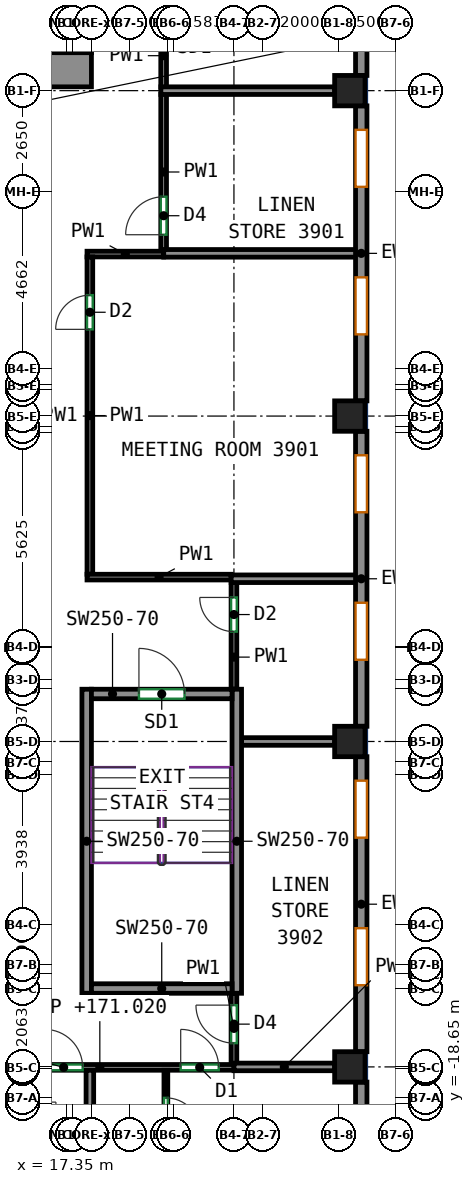
"""IFC4 building model, lengths in metres.
Left out: names, types, materials, properties, quantities, classifications, styles, units other than length and angle.
Written with IfcOpenShell. Run it as: python <this file> out.ifc"""

import sys

from ifc_helpers import new_model, si_unit, direction, frame, frame_2d, origin, origin_2d, place, context, subcontext, project, spatial, rectangle, extrude, source, transform, mapped, element, fill, save


model = new_model("IFC4")
c1 = context("Model", 3, precision=1e-05, world=origin(), true_north=direction((0.0, 1.0)))
c2 = subcontext(c1, "Body", "Model", "MODEL_VIEW")
j1 = project(units=[si_unit("LENGTHUNIT", "METRE"), si_unit("PLANEANGLEUNIT", "RADIAN")], contexts=[c1])
p1 = place(None, origin())
s1 = spatial("IfcSite", under=j1, at=p1, CompositionType="ELEMENT")
p2 = place(p1, origin())
s2 = spatial("IfcBuilding", under=s1, at=p2, CompositionType="ELEMENT")
p3 = place(p2, frame((0.0, 0.0, 168.5)))
s3 = spatial("IfcBuildingStorey", under=s2, at=p3, CompositionType="ELEMENT", Elevation=168.5)
m1 = source(origin(), c2, "Body", "SweptSolid", [
    extrude(rectangle(XDim=0.8, YDim=0.8, at=origin_2d()), origin(), (0.0, 0.0, 1.0), 3.12),
])
for number, where, z_axis, x_axis in (
    (1, (24.8, -17.688, 0.0), (0.0, 0.0, 1.0), (1.0, 0.0, 0.0)),
    (2, (24.8, -9.125, 0.0), (0.0, 0.0, 1.0), (1.0, 0.0, 0.0)),
    (3, (24.8, -0.562, 0.0), (0.0, 0.0, 1.0), (1.0, 0.0, 0.0)),
    (4, (24.8, 8.0, 0.0), (0.0, 0.0, 1.0), (1.0, 0.0, 0.0)),
):
    element("IfcColumn", number, at=place(p3, frame(where, z_axis=z_axis, x_axis=x_axis)), inside=s3, PredefinedType="COLUMN", context=c2, shape_type="MappedRepresentation", body=[
        mapped(m1, transform((0.0, 0.0, 0.0))),
    ])
m2 = source(origin(), c2, "Body", "SweptSolid", [
    extrude(rectangle(XDim=5.53, YDim=0.9, at=frame_2d((2.765, 0.0))), origin(), (0.0, 0.0, 1.0), 3.12),
])
p4 = place(p3, frame((12.47, 8.55, 0.0), z_axis=(0.0, 0.0, 1.0), x_axis=(1.0, 0.0, 0.0)))
e5 = element("IfcWall", 5, at=p4, inside=s3, PredefinedType="SHEAR", context=c2, shape_type="MappedRepresentation", body=[
    mapped(m2, transform((0.0, 0.0, 0.0))),
])
p5 = place(p4, frame((2.18, 0.0, 0.0)))
e6 = element("IfcOpeningElement", 6, at=p5, cuts=e5, PredefinedType="OPENING", context=c2, shape_type="SweptSolid", body=[
    extrude(rectangle(XDim=1.2, YDim=2.1, at=frame_2d((0.6, 1.05))), frame((0.0, 0.46, 0.0), z_axis=(0.0, -1.0, 0.0), x_axis=(1.0, 0.0, 0.0)), (0.0, 0.0, 1.0), 0.92),
])
m3 = source(origin(), c2, "Body", "SweptSolid", [
    extrude(rectangle(XDim=8.0, YDim=0.25, at=frame_2d((4.0, 0.0))), origin(), (0.0, 0.0, 1.0), 3.12),
])
for number, where, z_axis, x_axis in (
    (7, (17.875, -15.75, 0.0), (0.0, 0.0, 1.0), (0.0, 1.0, 0.0)),
    (8, (21.825, -15.75, 0.0), (0.0, 0.0, 1.0), (0.0, 1.0, 0.0)),
):
    element("IfcWall", number, at=place(p3, frame(where, z_axis=z_axis, x_axis=x_axis)), inside=s3, PredefinedType="SHEAR", context=c2, shape_type="MappedRepresentation", body=[
        mapped(m3, transform((0.0, 0.0, 0.0))),
    ])
m4 = source(origin(), c2, "Body", "SweptSolid", [
    extrude(rectangle(XDim=3.7, YDim=0.25, at=frame_2d((1.85, 0.0))), origin(), (0.0, 0.0, 1.0), 3.12),
])
p6 = place(p3, frame((18.0, -15.625, 0.0), z_axis=(0.0, 0.0, 1.0), x_axis=(1.0, 0.0, 0.0)))
e9 = element("IfcWall", 9, at=p6, inside=s3, PredefinedType="SHEAR", context=c2, shape_type="MappedRepresentation", body=[
    mapped(m4, transform((0.0, 0.0, 0.0))),
])
p7 = place(p3, frame((18.0, -7.875, 0.0), z_axis=(0.0, 0.0, 1.0), x_axis=(1.0, 0.0, 0.0)))
e10 = element("IfcWall", 10, at=p7, inside=s3, PredefinedType="SHEAR", context=c2, shape_type="MappedRepresentation", body=[
    mapped(m4, transform((0.0, 0.0, 0.0))),
])
p8 = place(p7, frame((1.25, 0.0, 0.0)))
e11 = element("IfcOpeningElement", 11, at=p8, cuts=e10, PredefinedType="OPENING", context=c2, shape_type="SweptSolid", body=[
    extrude(rectangle(XDim=1.2, YDim=2.1, at=frame_2d((0.6, 1.05))), frame((0.0, 0.135, 0.0), z_axis=(0.0, -1.0, 0.0), x_axis=(1.0, 0.0, 0.0)), (0.0, 0.0, 1.0), 0.27),
])
m5 = source(origin(), c2, "Body", "SweptSolid", [
    extrude(rectangle(XDim=3.944, YDim=0.3, at=frame_2d((1.972, 0.0))), origin(), (0.0, 0.0, 1.0), 3.12),
])
p9 = place(p3, frame((25.1, -22.032, 0.0), z_axis=(0.0, 0.0, 1.0), x_axis=(0.0, 1.0, 0.0)))
e12 = element("IfcWall", 12, at=p9, inside=s3, PredefinedType="SOLIDWALL", context=c2, shape_type="MappedRepresentation", body=[
    mapped(m5, transform((0.0, 0.0, 0.0))),
])
p10 = place(p9, frame((1.75, 0.0, 0.85)))
e13 = element("IfcOpeningElement", 13, at=p10, cuts=e12, PredefinedType="OPENING", context=c2, shape_type="SweptSolid", body=[
    extrude(rectangle(XDim=1.5, YDim=1.95, at=frame_2d((0.75, 0.975))), frame((0.0, 0.16, 0.0), z_axis=(0.0, -1.0, 0.0), x_axis=(1.0, 0.0, 0.0)), (0.0, 0.0, 1.0), 0.32),
])
m6 = source(origin(), c2, "Body", "SweptSolid", [
    extrude(rectangle(XDim=7.763, YDim=0.3, at=frame_2d((3.881, 0.0))), origin(), (0.0, 0.0, 1.0), 3.12),
])
p11 = place(p3, frame((25.1, -17.288, 0.0), z_axis=(0.0, 0.0, 1.0), x_axis=(0.0, 1.0, 0.0)))
e14 = element("IfcWall", 14, at=p11, inside=s3, PredefinedType="SOLIDWALL", context=c2, shape_type="MappedRepresentation", body=[
    mapped(m6, transform((0.0, 0.0, 0.0))),
])
p12 = place(p11, frame((1.75, 0.0, 0.85)))
e15 = element("IfcOpeningElement", 15, at=p12, cuts=e14, PredefinedType="OPENING", context=c2, shape_type="SweptSolid", body=[
    extrude(rectangle(XDim=1.5, YDim=1.95, at=frame_2d((0.75, 0.975))), frame((0.0, 0.16, 0.0), z_axis=(0.0, -1.0, 0.0), x_axis=(1.0, 0.0, 0.0)), (0.0, 0.0, 1.0), 0.32),
])
p13 = place(p11, frame((5.631, 0.0, 0.85)))
e16 = element("IfcOpeningElement", 16, at=p13, cuts=e14, PredefinedType="OPENING", context=c2, shape_type="SweptSolid", body=[
    extrude(rectangle(XDim=1.5, YDim=1.95, at=frame_2d((0.75, 0.975))), frame((0.0, 0.16, 0.0), z_axis=(0.0, -1.0, 0.0), x_axis=(1.0, 0.0, 0.0)), (0.0, 0.0, 1.0), 0.32),
])
p14 = place(p3, frame((25.1, -8.725, 0.0), z_axis=(0.0, 0.0, 1.0), x_axis=(0.0, 1.0, 0.0)))
e17 = element("IfcWall", 17, at=p14, inside=s3, PredefinedType="SOLIDWALL", context=c2, shape_type="MappedRepresentation", body=[
    mapped(m6, transform((0.0, 0.0, 0.0))),
])
p15 = place(p14, frame((1.75, 0.0, 0.85)))
e18 = element("IfcOpeningElement", 18, at=p15, cuts=e17, PredefinedType="OPENING", context=c2, shape_type="SweptSolid", body=[
    extrude(rectangle(XDim=1.5, YDim=1.95, at=frame_2d((0.75, 0.975))), frame((0.0, 0.16, 0.0), z_axis=(0.0, -1.0, 0.0), x_axis=(1.0, 0.0, 0.0)), (0.0, 0.0, 1.0), 0.32),
])
p16 = place(p14, frame((5.631, 0.0, 0.85)))
e19 = element("IfcOpeningElement", 19, at=p16, cuts=e17, PredefinedType="OPENING", context=c2, shape_type="SweptSolid", body=[
    extrude(rectangle(XDim=1.5, YDim=1.95, at=frame_2d((0.75, 0.975))), frame((0.0, 0.16, 0.0), z_axis=(0.0, -1.0, 0.0), x_axis=(1.0, 0.0, 0.0)), (0.0, 0.0, 1.0), 0.32),
])
p17 = place(p3, frame((25.1, -0.163, 0.0), z_axis=(0.0, 0.0, 1.0), x_axis=(0.0, 1.0, 0.0)))
e20 = element("IfcWall", 20, at=p17, inside=s3, PredefinedType="SOLIDWALL", context=c2, shape_type="MappedRepresentation", body=[
    mapped(m6, transform((0.0, 0.0, 0.0))),
])
p18 = place(p17, frame((1.75, 0.0, 0.85)))
e21 = element("IfcOpeningElement", 21, at=p18, cuts=e20, PredefinedType="OPENING", context=c2, shape_type="SweptSolid", body=[
    extrude(rectangle(XDim=1.5, YDim=1.95, at=frame_2d((0.75, 0.975))), frame((0.0, 0.16, 0.0), z_axis=(0.0, -1.0, 0.0), x_axis=(1.0, 0.0, 0.0)), (0.0, 0.0, 1.0), 0.32),
])
p19 = place(p17, frame((5.631, 0.0, 0.85)))
e22 = element("IfcOpeningElement", 22, at=p19, cuts=e20, PredefinedType="OPENING", context=c2, shape_type="SweptSolid", body=[
    extrude(rectangle(XDim=1.5, YDim=1.95, at=frame_2d((0.75, 0.975))), frame((0.0, 0.16, 0.0), z_axis=(0.0, -1.0, 0.0), x_axis=(1.0, 0.0, 0.0)), (0.0, 0.0, 1.0), 0.32),
])
m7 = source(origin(), c2, "Body", "SweptSolid", [
    extrude(rectangle(XDim=13.95, YDim=0.3, at=frame_2d((6.975, 0.0))), origin(), (0.0, 0.0, 1.0), 3.12),
])
p20 = place(p3, frame((25.1, 8.4, 0.0), z_axis=(0.0, 0.0, 1.0), x_axis=(0.0, 1.0, 0.0)))
e23 = element("IfcWall", 23, at=p20, inside=s3, PredefinedType="SOLIDWALL", context=c2, shape_type="MappedRepresentation", body=[
    mapped(m7, transform((0.0, 0.0, 0.0))),
])
p21 = place(p20, frame((0.994, 0.0, 0.85)))
e24 = element("IfcOpeningElement", 24, at=p21, cuts=e23, PredefinedType="OPENING", context=c2, shape_type="SweptSolid", body=[
    extrude(rectangle(XDim=1.5, YDim=1.95, at=frame_2d((0.75, 0.975))), frame((0.0, 0.16, 0.0), z_axis=(0.0, -1.0, 0.0), x_axis=(1.0, 0.0, 0.0)), (0.0, 0.0, 1.0), 0.32),
])
p22 = place(p20, frame((4.481, 0.0, 0.85)))
e25 = element("IfcOpeningElement", 25, at=p22, cuts=e23, PredefinedType="OPENING", context=c2, shape_type="SweptSolid", body=[
    extrude(rectangle(XDim=1.5, YDim=1.95, at=frame_2d((0.75, 0.975))), frame((0.0, 0.16, 0.0), z_axis=(0.0, -1.0, 0.0), x_axis=(1.0, 0.0, 0.0)), (0.0, 0.0, 1.0), 0.32),
])
p23 = place(p20, frame((7.969, 0.0, 0.85)))
e26 = element("IfcOpeningElement", 26, at=p23, cuts=e23, PredefinedType="OPENING", context=c2, shape_type="SweptSolid", body=[
    extrude(rectangle(XDim=1.5, YDim=1.95, at=frame_2d((0.75, 0.975))), frame((0.0, 0.16, 0.0), z_axis=(0.0, -1.0, 0.0), x_axis=(1.0, 0.0, 0.0)), (0.0, 0.0, 1.0), 0.32),
])
p24 = place(p20, frame((11.456, 0.0, 0.85)))
e27 = element("IfcOpeningElement", 27, at=p24, cuts=e23, PredefinedType="OPENING", context=c2, shape_type="SweptSolid", body=[
    extrude(rectangle(XDim=1.5, YDim=1.95, at=frame_2d((0.75, 0.975))), frame((0.0, 0.16, 0.0), z_axis=(0.0, -1.0, 0.0), x_axis=(1.0, 0.0, 0.0)), (0.0, 0.0, 1.0), 0.32),
])
p25 = place(p3, frame((14.692, -17.7, 0.0), z_axis=(0.0, 0.0, 1.0), x_axis=(1.0, 0.0, 0.0)))
e28 = element("IfcWall", 28, at=p25, inside=s3, PredefinedType="PARTITIONING", context=c2, shape_type="SweptSolid", body=[
    extrude(rectangle(XDim=7.058, YDim=0.15, at=frame_2d((3.529, 0.0))), origin(), (0.0, 0.0, 1.0), 2.52),
])
p26 = place(p25, frame((2.077, 0.0, 0.0)))
e29 = element("IfcOpeningElement", 29, at=p26, cuts=e28, PredefinedType="OPENING", context=c2, shape_type="SweptSolid", body=[
    extrude(rectangle(XDim=1.0, YDim=2.1, at=frame_2d((0.5, 1.05))), frame((0.0, 0.085, 0.0), z_axis=(0.0, -1.0, 0.0), x_axis=(1.0, 0.0, 0.0)), (0.0, 0.0, 1.0), 0.17),
])
p27 = place(p25, frame((5.657, 0.0, 0.0)))
e30 = element("IfcOpeningElement", 30, at=p27, cuts=e28, PredefinedType="OPENING", context=c2, shape_type="SweptSolid", body=[
    extrude(rectangle(XDim=1.0, YDim=2.1, at=frame_2d((0.5, 1.05))), frame((0.0, 0.085, 0.0), z_axis=(0.0, -1.0, 0.0), x_axis=(1.0, 0.0, 0.0)), (0.0, 0.0, 1.0), 0.17),
])
p28 = place(p3, frame((19.9, 3.809, 0.0), z_axis=(0.0, 0.0, 1.0), x_axis=(0.0, 1.0, 0.0)))
e31 = element("IfcWall", 31, at=p28, inside=s3, PredefinedType="PARTITIONING", context=c2, shape_type="SweptSolid", body=[
    extrude(rectangle(XDim=4.101, YDim=0.15, at=frame_2d((2.05, 0.0))), origin(), (0.0, 0.0, 1.0), 3.12),
])
p29 = place(p28, frame((0.4, 0.0, 0.0)))
e32 = element("IfcOpeningElement", 32, at=p29, cuts=e31, PredefinedType="OPENING", context=c2, shape_type="SweptSolid", body=[
    extrude(rectangle(XDim=1.0, YDim=2.1, at=frame_2d((0.5, 1.05))), frame((0.0, 0.085, 0.0), z_axis=(0.0, -1.0, 0.0), x_axis=(1.0, 0.0, 0.0)), (0.0, 0.0, 1.0), 0.17),
])
p30 = place(p3, frame((19.9, 8.09, 0.0), z_axis=(0.0, 0.0, 1.0), x_axis=(0.0, 1.0, 0.0)))
e33 = element("IfcWall", 33, at=p30, inside=s3, PredefinedType="PARTITIONING", context=c2, shape_type="SweptSolid", body=[
    extrude(rectangle(XDim=1.66, YDim=0.15, at=frame_2d((0.83, 0.0))), origin(), (0.0, 0.0, 1.0), 3.12),
])
p31 = place(p3, frame((17.884, 3.7, 0.0), z_axis=(0.0, 0.0, 1.0), x_axis=(1.0, 0.0, 0.0)))
e34 = element("IfcWall", 34, at=p31, inside=s3, PredefinedType="PARTITIONING", context=c2, shape_type="SweptSolid", body=[
    extrude(rectangle(XDim=2.016, YDim=0.15, at=frame_2d((1.008, 0.0))), origin(), (0.0, 0.0, 1.0), 3.12),
])
p32 = place(p3, frame((17.959, -4.725, 0.0), z_axis=(0.0, 0.0, 1.0), x_axis=(0.0, 1.0, 0.0)))
e35 = element("IfcWall", 35, at=p32, inside=s3, PredefinedType="PARTITIONING", context=c2, shape_type="SweptSolid", body=[
    extrude(rectangle(XDim=8.35, YDim=0.15, at=frame_2d((4.175, 0.0))), origin(), (0.0, 0.0, 1.0), 3.12),
])
p33 = place(p32, frame((6.444, 0.0, 0.0)))
e36 = element("IfcOpeningElement", 36, at=p33, cuts=e35, PredefinedType="OPENING", context=c2, shape_type="SweptSolid", body=[
    extrude(rectangle(XDim=0.9, YDim=2.1, at=frame_2d((0.45, 1.05))), frame((0.0, 0.085, 0.0), z_axis=(0.0, -1.0, 0.0), x_axis=(1.0, 0.0, 0.0)), (0.0, 0.0, 1.0), 0.17),
])
p34 = place(p3, frame((17.884, -4.8, 0.0), z_axis=(0.0, 0.0, 1.0), x_axis=(1.0, 0.0, 0.0)))
e37 = element("IfcWall", 37, at=p34, inside=s3, PredefinedType="PARTITIONING", context=c2, shape_type="SweptSolid", body=[
    extrude(rectangle(XDim=3.793, YDim=0.15, at=frame_2d((1.896, 0.0))), origin(), (0.0, 0.0, 1.0), 3.12),
])
p35 = place(p3, frame((21.75, -7.75, 0.0), z_axis=(0.0, 0.0, 1.0), x_axis=(0.0, 1.0, 0.0)))
e38 = element("IfcWall", 38, at=p35, inside=s3, PredefinedType="PARTITIONING", context=c2, shape_type="SweptSolid", body=[
    extrude(rectangle(XDim=2.817, YDim=0.15, at=frame_2d((1.408, 0.0))), origin(), (0.0, 0.0, 1.0), 3.12),
])
p36 = place(p35, frame((1.515, 0.0, 0.0)))
e39 = element("IfcOpeningElement", 39, at=p36, cuts=e38, PredefinedType="OPENING", context=c2, shape_type="SweptSolid", body=[
    extrude(rectangle(XDim=0.9, YDim=2.1, at=frame_2d((0.45, 1.05))), frame((0.0, 0.085, 0.0), z_axis=(0.0, -1.0, 0.0), x_axis=(1.0, 0.0, 0.0)), (0.0, 0.0, 1.0), 0.17),
])
p37 = place(p3, frame((21.75, -17.598, 0.0), z_axis=(0.0, 0.0, 1.0), x_axis=(0.0, 1.0, 0.0)))
e40 = element("IfcWall", 40, at=p37, inside=s3, PredefinedType="PARTITIONING", context=c2, shape_type="SweptSolid", body=[
    extrude(rectangle(XDim=1.848, YDim=0.15, at=frame_2d((0.924, 0.0))), origin(), (0.0, 0.0, 1.0), 3.12),
])
p38 = place(p37, frame((0.536, 0.0, 0.0)))
e41 = element("IfcOpeningElement", 41, at=p38, cuts=e40, PredefinedType="OPENING", context=c2, shape_type="SweptSolid", body=[
    extrude(rectangle(XDim=1.0, YDim=2.1, at=frame_2d((0.5, 1.05))), frame((0.0, 0.085, 0.0), z_axis=(0.0, -1.0, 0.0), x_axis=(1.0, 0.0, 0.0)), (0.0, 0.0, 1.0), 0.17),
])
p39 = place(p3, frame((17.959, -20.348, 0.0), z_axis=(0.0, 0.0, 1.0), x_axis=(0.0, 1.0, 0.0)))
e42 = element("IfcWall", 42, at=p39, inside=s3, PredefinedType="PARTITIONING", context=c2, shape_type="SweptSolid", body=[
    extrude(rectangle(XDim=2.571, YDim=0.2, at=frame_2d((1.285, 0.0))), origin(), (0.0, 0.0, 1.0), 3.12),
])
p40 = place(p3, frame((19.959, -17.777, 0.0), z_axis=(0.0, 0.0, 1.0), x_axis=(0.0, -1.0, 0.0)))
e43 = element("IfcWall", 43, at=p40, inside=s3, PredefinedType="PARTITIONING", context=c2, shape_type="SweptSolid", body=[
    extrude(rectangle(XDim=2.561, YDim=0.1, at=frame_2d((1.28, 0.0))), origin(), (0.0, 0.0, 1.0), 3.12),
])
p41 = place(p40, frame((0.725, 0.0, 0.0)))
e44 = element("IfcOpeningElement", 44, at=p41, cuts=e43, PredefinedType="OPENING", context=c2, shape_type="SweptSolid", body=[
    extrude(rectangle(XDim=0.9, YDim=2.1, at=frame_2d((0.45, 1.05))), frame((0.0, 0.06, 0.0), z_axis=(0.0, -1.0, 0.0), x_axis=(1.0, 0.0, 0.0)), (0.0, 0.0, 1.0), 0.12),
])
p42 = place(p3, frame((21.752, -17.688, 0.0), z_axis=(0.0, 0.0, 1.0), x_axis=(1.0, 0.0, 0.0)))
e45 = element("IfcWall", 45, at=p42, inside=s3, PredefinedType="PARTITIONING", context=c2, shape_type="SweptSolid", body=[
    extrude(rectangle(XDim=2.648, YDim=0.2, at=frame_2d((1.324, 0.0))), origin(), (0.0, 0.0, 1.0), 2.52),
])
p43 = place(p3, frame((19.827, 8.0, 0.0), z_axis=(0.0, 0.0, 1.0), x_axis=(1.0, 0.0, 0.0)))
e46 = element("IfcWall", 46, at=p43, inside=s3, PredefinedType="PARTITIONING", context=c2, shape_type="SweptSolid", body=[
    extrude(rectangle(XDim=4.573, YDim=0.2, at=frame_2d((2.287, 0.0))), origin(), (0.0, 0.0, 1.0), 3.12),
])
p44 = place(p3, frame((19.902, 3.719, 0.0), z_axis=(0.0, 0.0, 1.0), x_axis=(1.0, 0.0, 0.0)))
e47 = element("IfcWall", 47, at=p44, inside=s3, PredefinedType="PARTITIONING", context=c2, shape_type="SweptSolid", body=[
    extrude(rectangle(XDim=5.098, YDim=0.2, at=frame_2d((2.549, 0.0))), origin(), (0.0, 0.0, 1.0), 3.12),
])
p45 = place(p3, frame((21.677, -4.843, 0.0), z_axis=(0.0, 0.0, 1.0), x_axis=(1.0, 0.0, 0.0)))
e48 = element("IfcWall", 48, at=p45, inside=s3, PredefinedType="PARTITIONING", context=c2, shape_type="SweptSolid", body=[
    extrude(rectangle(XDim=3.323, YDim=0.2, at=frame_2d((1.662, 0.0))), origin(), (0.0, 0.0, 1.0), 3.12),
])
p46 = place(p3, frame((21.95, -9.125, 0.0), z_axis=(0.0, 0.0, 1.0), x_axis=(1.0, 0.0, 0.0)))
e49 = element("IfcWall", 49, at=p46, inside=s3, PredefinedType="PARTITIONING", context=c2, shape_type="SweptSolid", body=[
    extrude(rectangle(XDim=2.45, YDim=0.2, at=frame_2d((1.225, 0.0))), origin(), (0.0, 0.0, 1.0), 3.12),
])
p47 = place(p12, origin())
e50 = element("IfcWindow", 50, at=p47, inside=s3, PartitioningType="SINGLE_PANEL", PredefinedType="WINDOW", context=c2, shape_type="SweptSolid", body=[
    extrude(rectangle(XDim=1.5, YDim=1.95, at=frame_2d((0.75, 0.975))), frame((0.0, 0.03, 0.0), z_axis=(0.0, -1.0, 0.0), x_axis=(1.0, 0.0, 0.0)), (0.0, 0.0, 1.0), 0.06),
])
fill(e15, e50)
p48 = place(p13, origin())
e51 = element("IfcWindow", 51, at=p48, inside=s3, PartitioningType="SINGLE_PANEL", PredefinedType="WINDOW", context=c2, shape_type="SweptSolid", body=[
    extrude(rectangle(XDim=1.5, YDim=1.95, at=frame_2d((0.75, 0.975))), frame((0.0, 0.03, 0.0), z_axis=(0.0, -1.0, 0.0), x_axis=(1.0, 0.0, 0.0)), (0.0, 0.0, 1.0), 0.06),
])
fill(e16, e51)
p49 = place(p15, origin())
e52 = element("IfcWindow", 52, at=p49, inside=s3, PartitioningType="SINGLE_PANEL", PredefinedType="WINDOW", context=c2, shape_type="SweptSolid", body=[
    extrude(rectangle(XDim=1.5, YDim=1.95, at=frame_2d((0.75, 0.975))), frame((0.0, 0.03, 0.0), z_axis=(0.0, -1.0, 0.0), x_axis=(1.0, 0.0, 0.0)), (0.0, 0.0, 1.0), 0.06),
])
fill(e18, e52)
p50 = place(p16, origin())
e53 = element("IfcWindow", 53, at=p50, inside=s3, PartitioningType="SINGLE_PANEL", PredefinedType="WINDOW", context=c2, shape_type="SweptSolid", body=[
    extrude(rectangle(XDim=1.5, YDim=1.95, at=frame_2d((0.75, 0.975))), frame((0.0, 0.03, 0.0), z_axis=(0.0, -1.0, 0.0), x_axis=(1.0, 0.0, 0.0)), (0.0, 0.0, 1.0), 0.06),
])
fill(e19, e53)
p51 = place(p18, origin())
e54 = element("IfcWindow", 54, at=p51, inside=s3, PartitioningType="SINGLE_PANEL", PredefinedType="WINDOW", context=c2, shape_type="SweptSolid", body=[
    extrude(rectangle(XDim=1.5, YDim=1.95, at=frame_2d((0.75, 0.975))), frame((0.0, 0.03, 0.0), z_axis=(0.0, -1.0, 0.0), x_axis=(1.0, 0.0, 0.0)), (0.0, 0.0, 1.0), 0.06),
])
fill(e21, e54)
p52 = place(p19, origin())
e55 = element("IfcWindow", 55, at=p52, inside=s3, PartitioningType="SINGLE_PANEL", PredefinedType="WINDOW", context=c2, shape_type="SweptSolid", body=[
    extrude(rectangle(XDim=1.5, YDim=1.95, at=frame_2d((0.75, 0.975))), frame((0.0, 0.03, 0.0), z_axis=(0.0, -1.0, 0.0), x_axis=(1.0, 0.0, 0.0)), (0.0, 0.0, 1.0), 0.06),
])
fill(e22, e55)
p53 = place(p8, origin())
e56 = element("IfcDoor", 56, at=p53, inside=s3, OperationType="DOUBLE_DOOR_SINGLE_SWING", PredefinedType="DOOR", context=c2, shape_type="SweptSolid", body=[
    extrude(rectangle(XDim=1.2, YDim=2.1, at=frame_2d((0.6, 1.05))), frame((0.0, 0.025, 0.0), z_axis=(0.0, -1.0, 0.0), x_axis=(1.0, 0.0, 0.0)), (0.0, 0.0, 1.0), 0.05),
])
fill(e11, e56)
p54 = place(p41, origin())
e57 = element("IfcDoor", 57, at=p54, inside=s3, OperationType="SINGLE_SWING_RIGHT", PredefinedType="DOOR", context=c2, shape_type="SweptSolid", body=[
    extrude(rectangle(XDim=0.9, YDim=2.1, at=frame_2d((0.45, 1.05))), frame((0.0, 0.025, 0.0), z_axis=(0.0, -1.0, 0.0), x_axis=(1.0, 0.0, 0.0)), (0.0, 0.0, 1.0), 0.05),
])
fill(e44, e57)
p55 = place(p26, origin())
e58 = element("IfcDoor", 58, at=p55, inside=s3, OperationType="SINGLE_SWING_LEFT", PredefinedType="DOOR", context=c2, shape_type="SweptSolid", body=[
    extrude(rectangle(XDim=1.0, YDim=2.1, at=frame_2d((0.5, 1.05))), frame((0.0, 0.025, 0.0), z_axis=(0.0, -1.0, 0.0), x_axis=(1.0, 0.0, 0.0)), (0.0, 0.0, 1.0), 0.05),
])
fill(e29, e58)
p56 = place(p27, origin())
e59 = element("IfcDoor", 59, at=p56, inside=s3, OperationType="SINGLE_SWING_LEFT", PredefinedType="DOOR", context=c2, shape_type="SweptSolid", body=[
    extrude(rectangle(XDim=1.0, YDim=2.1, at=frame_2d((0.5, 1.05))), frame((0.0, 0.025, 0.0), z_axis=(0.0, -1.0, 0.0), x_axis=(1.0, 0.0, 0.0)), (0.0, 0.0, 1.0), 0.05),
])
fill(e30, e59)
p57 = place(p38, origin())
e60 = element("IfcDoor", 60, at=p57, inside=s3, OperationType="SINGLE_SWING_RIGHT", PredefinedType="DOOR", context=c2, shape_type="SweptSolid", body=[
    extrude(rectangle(XDim=1.0, YDim=2.1, at=frame_2d((0.5, 1.05))), frame((0.0, 0.025, 0.0), z_axis=(0.0, -1.0, 0.0), x_axis=(1.0, 0.0, 0.0)), (0.0, 0.0, 1.0), 0.05),
])
fill(e41, e60)
p58 = place(p36, origin())
e61 = element("IfcDoor", 61, at=p58, inside=s3, OperationType="SINGLE_SWING_RIGHT", PredefinedType="DOOR", context=c2, shape_type="SweptSolid", body=[
    extrude(rectangle(XDim=0.9, YDim=2.1, at=frame_2d((0.45, 1.05))), frame((0.0, 0.025, 0.0), z_axis=(0.0, -1.0, 0.0), x_axis=(1.0, 0.0, 0.0)), (0.0, 0.0, 1.0), 0.05),
])
fill(e39, e61)
p59 = place(p33, origin())
e62 = element("IfcDoor", 62, at=p59, inside=s3, OperationType="SINGLE_SWING_LEFT", PredefinedType="DOOR", context=c2, shape_type="SweptSolid", body=[
    extrude(rectangle(XDim=0.9, YDim=2.1, at=frame_2d((0.45, 1.05))), frame((0.0, 0.025, 0.0), z_axis=(0.0, -1.0, 0.0), x_axis=(1.0, 0.0, 0.0)), (0.0, 0.0, 1.0), 0.05),
])
fill(e36, e62)
p60 = place(p29, origin())
e63 = element("IfcDoor", 63, at=p60, inside=s3, OperationType="SINGLE_SWING_LEFT", PredefinedType="DOOR", context=c2, shape_type="SweptSolid", body=[
    extrude(rectangle(XDim=1.0, YDim=2.1, at=frame_2d((0.5, 1.05))), frame((0.0, 0.025, 0.0), z_axis=(0.0, -1.0, 0.0), x_axis=(1.0, 0.0, 0.0)), (0.0, 0.0, 1.0), 0.05),
])
fill(e32, e63)
save(model, sys.argv[1])
